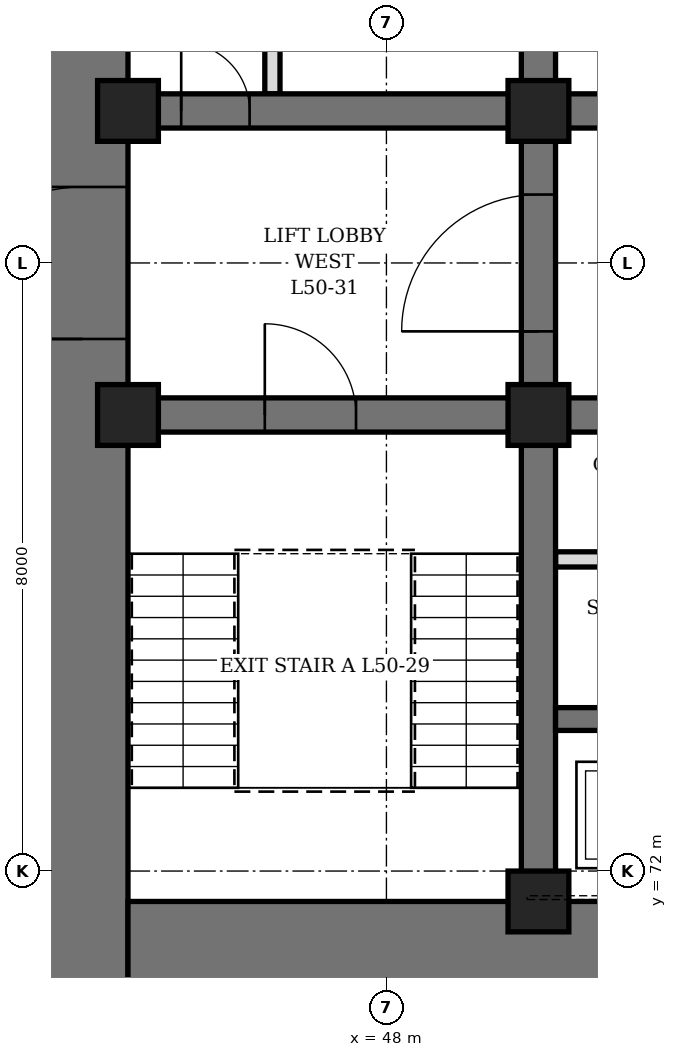
"""IFC4 building model, lengths in metres.
Left out: names, types, materials, properties, quantities, classifications, styles, units other than length and angle.
Written with IfcOpenShell. Run it as: python <this file> out.ifc"""

import sys

from ifc_helpers import new_model, si_unit, direction, frame, frame_2d, origin, origin_2d, place, context, subcontext, project, spatial, rectangle, hollow_rectangle, extrude, element, fill, save


model = new_model("IFC4")
c1 = context("Model", 3, precision=1e-05, world=origin(), true_north=direction((0.0, 1.0)))
c2 = subcontext(c1, "Body", "Model", "MODEL_VIEW")
j1 = project(units=[si_unit("LENGTHUNIT", "METRE"), si_unit("PLANEANGLEUNIT", "RADIAN")], contexts=[c1])
p1 = place(None, origin())
s1 = spatial("IfcSite", under=j1, at=p1, CompositionType="ELEMENT")
p2 = place(p1, origin())
s2 = spatial("IfcBuilding", under=s1, at=p2, CompositionType="ELEMENT")
p3 = place(p2, frame((0.0, 0.0, 223.3)))
s3 = spatial("IfcBuildingStorey", under=s2, at=p3, CompositionType="ELEMENT", Elevation=223.3)
p4 = place(p3, frame((44.0, 70.4, 0.0), z_axis=(0.0, 0.0, 1.0), x_axis=(0.0, 1.0, 0.0)))
e1 = element("IfcWall", 1, at=p4, inside=s3, PredefinedType="SHEAR", context=c2, shape_type="SweptSolid", body=[
    extrude(rectangle(XDim=19.2, YDim=1.2, at=frame_2d((9.6, 0.0))), origin(), (0.0, 0.0, 1.0), 4.2),
])
p5 = place(p4, frame((8.6, 0.0, 0.0)))
e2 = element("IfcOpeningElement", 2, at=p5, cuts=e1, PredefinedType="OPENING", context=c2, shape_type="SweptSolid", body=[
    extrude(rectangle(XDim=2.0, YDim=2.4, at=frame_2d((1.0, 1.2))), frame((0.0, 0.61, 0.0), z_axis=(0.0, -1.0, 0.0), x_axis=(1.0, 0.0, 0.0)), (0.0, 0.0, 1.0), 1.22),
])
p6 = place(p3, frame((44.6, 71.0, 0.0), z_axis=(0.0, 0.0, 1.0), x_axis=(1.0, 0.0, 0.0)))
e3 = element("IfcWall", 3, at=p6, inside=s3, PredefinedType="SHEAR", context=c2, shape_type="SweptSolid", body=[
    extrude(rectangle(XDim=22.8, YDim=1.2, at=frame_2d((11.4, 0.0))), origin(), (0.0, 0.0, 1.0), 4.2),
])
p7 = place(p6, frame((6.35, 0.0, 0.0)))
e4 = element("IfcOpeningElement", 4, at=p7, cuts=e3, PredefinedType="OPENING", context=c2, shape_type="SweptSolid", body=[
    extrude(rectangle(XDim=1.1, YDim=2.2, at=frame_2d((0.55, 1.1))), frame((0.0, 0.61, 0.0), z_axis=(0.0, -1.0, 0.0), x_axis=(1.0, 0.0, 0.0)), (0.0, 0.0, 1.0), 1.22),
])
p8 = place(p6, frame((9.35, 0.0, 0.0)))
e5 = element("IfcOpeningElement", 5, at=p8, cuts=e3, PredefinedType="OPENING", context=c2, shape_type="SweptSolid", body=[
    extrude(rectangle(XDim=1.1, YDim=2.2, at=frame_2d((0.55, 1.1))), frame((0.0, 0.61, 0.0), z_axis=(0.0, -1.0, 0.0), x_axis=(1.0, 0.0, 0.0)), (0.0, 0.0, 1.0), 1.22),
])
p9 = place(p6, frame((12.35, 0.0, 0.0)))
e6 = element("IfcOpeningElement", 6, at=p9, cuts=e3, PredefinedType="OPENING", context=c2, shape_type="SweptSolid", body=[
    extrude(rectangle(XDim=1.1, YDim=2.2, at=frame_2d((0.55, 1.1))), frame((0.0, 0.61, 0.0), z_axis=(0.0, -1.0, 0.0), x_axis=(1.0, 0.0, 0.0)), (0.0, 0.0, 1.0), 1.22),
])
p10 = place(p6, frame((15.35, 0.0, 0.0)))
e7 = element("IfcOpeningElement", 7, at=p10, cuts=e3, PredefinedType="OPENING", context=c2, shape_type="SweptSolid", body=[
    extrude(rectangle(XDim=1.1, YDim=2.2, at=frame_2d((0.55, 1.1))), frame((0.0, 0.61, 0.0), z_axis=(0.0, -1.0, 0.0), x_axis=(1.0, 0.0, 0.0)), (0.0, 0.0, 1.0), 1.22),
])
p11 = place(p3, frame((50.0, 71.6, 0.0), z_axis=(0.0, 0.0, 1.0), x_axis=(0.0, 1.0, 0.0)))
e8 = element("IfcWall", 8, at=p11, inside=s3, PredefinedType="SHEAR", context=c2, shape_type="SweptSolid", body=[
    extrude(rectangle(XDim=16.8, YDim=0.45, at=frame_2d((8.4, 0.0))), origin(), (0.0, 0.0, 1.0), 4.2),
])
p12 = place(p11, frame((7.5, 0.0, 0.0)))
e9 = element("IfcOpeningElement", 9, at=p12, cuts=e8, PredefinedType="OPENING", context=c2, shape_type="SweptSolid", body=[
    extrude(rectangle(XDim=1.8, YDim=2.4, at=frame_2d((0.9, 1.2))), frame((0.0, 0.235, 0.0), z_axis=(0.0, -1.0, 0.0), x_axis=(1.0, 0.0, 0.0)), (0.0, 0.0, 1.0), 0.47),
])
p13 = place(p3, frame((44.6, 78.0, 0.0), z_axis=(0.0, 0.0, 1.0), x_axis=(1.0, 0.0, 0.0)))
e10 = element("IfcWall", 10, at=p13, inside=s3, PredefinedType="SHEAR", context=c2, shape_type="SweptSolid", body=[
    extrude(rectangle(XDim=5.175, YDim=0.45, at=frame_2d((2.587, 0.0))), origin(), (0.0, 0.0, 1.0), 4.2),
])
p14 = place(p13, frame((1.8, 0.0, 0.0)))
e11 = element("IfcOpeningElement", 11, at=p14, cuts=e10, PredefinedType="OPENING", context=c2, shape_type="SweptSolid", body=[
    extrude(rectangle(XDim=1.2, YDim=2.1, at=frame_2d((0.6, 1.05))), frame((0.0, 0.235, 0.0), z_axis=(0.0, -1.0, 0.0), x_axis=(1.0, 0.0, 0.0)), (0.0, 0.0, 1.0), 0.47),
])
p15 = place(p3, frame((44.6, 82.0, 0.0), z_axis=(0.0, 0.0, 1.0), x_axis=(1.0, 0.0, 0.0)))
e12 = element("IfcWall", 12, at=p15, inside=s3, PredefinedType="SHEAR", context=c2, shape_type="SweptSolid", body=[
    extrude(rectangle(XDim=5.175, YDim=0.45, at=frame_2d((2.587, 0.0))), origin(), (0.0, 0.0, 1.0), 4.2),
])
p16 = place(p15, frame((0.7, 0.0, 0.0)))
e13 = element("IfcOpeningElement", 13, at=p16, cuts=e12, PredefinedType="OPENING", context=c2, shape_type="SweptSolid", body=[
    extrude(rectangle(XDim=0.9, YDim=2.1, at=frame_2d((0.45, 1.05))), frame((0.0, 0.235, 0.0), z_axis=(0.0, -1.0, 0.0), x_axis=(1.0, 0.0, 0.0)), (0.0, 0.0, 1.0), 0.47),
])
p17 = place(p3, frame((50.225, 78.0, 0.0), z_axis=(0.0, 0.0, 1.0), x_axis=(1.0, 0.0, 0.0)))
e14 = element("IfcWall", 14, at=p17, inside=s3, PredefinedType="SHEAR", context=c2, shape_type="SweptSolid", body=[
    extrude(rectangle(XDim=11.55, YDim=0.45, at=frame_2d((5.775, 0.0))), origin(), (0.0, 0.0, 1.0), 4.2),
])
p18 = place(p17, frame((0.825, 0.0, 0.0)))
e15 = element("IfcOpeningElement", 15, at=p18, cuts=e14, PredefinedType="OPENING", context=c2, shape_type="SweptSolid", body=[
    extrude(rectangle(XDim=0.9, YDim=2.1, at=frame_2d((0.45, 1.05))), frame((0.0, 0.235, 0.0), z_axis=(0.0, -1.0, 0.0), x_axis=(1.0, 0.0, 0.0)), (0.0, 0.0, 1.0), 0.47),
])
p19 = place(p17, frame((3.825, 0.0, 0.0)))
e16 = element("IfcOpeningElement", 16, at=p19, cuts=e14, PredefinedType="OPENING", context=c2, shape_type="SweptSolid", body=[
    extrude(rectangle(XDim=0.9, YDim=2.1, at=frame_2d((0.45, 1.05))), frame((0.0, 0.235, 0.0), z_axis=(0.0, -1.0, 0.0), x_axis=(1.0, 0.0, 0.0)), (0.0, 0.0, 1.0), 0.47),
])
p20 = place(p17, frame((6.825, 0.0, 0.0)))
e17 = element("IfcOpeningElement", 17, at=p20, cuts=e14, PredefinedType="OPENING", context=c2, shape_type="SweptSolid", body=[
    extrude(rectangle(XDim=0.9, YDim=2.1, at=frame_2d((0.45, 1.05))), frame((0.0, 0.235, 0.0), z_axis=(0.0, -1.0, 0.0), x_axis=(1.0, 0.0, 0.0)), (0.0, 0.0, 1.0), 0.47),
])
p21 = place(p17, frame((9.825, 0.0, 0.0)))
e18 = element("IfcOpeningElement", 18, at=p21, cuts=e14, PredefinedType="OPENING", context=c2, shape_type="SweptSolid", body=[
    extrude(rectangle(XDim=0.9, YDim=2.1, at=frame_2d((0.45, 1.05))), frame((0.0, 0.235, 0.0), z_axis=(0.0, -1.0, 0.0), x_axis=(1.0, 0.0, 0.0)), (0.0, 0.0, 1.0), 0.47),
])
p22 = place(p3, frame((50.225, 82.0, 0.0), z_axis=(0.0, 0.0, 1.0), x_axis=(1.0, 0.0, 0.0)))
e19 = element("IfcWall", 19, at=p22, inside=s3, PredefinedType="SHEAR", context=c2, shape_type="SweptSolid", body=[
    extrude(rectangle(XDim=11.55, YDim=0.45, at=frame_2d((5.775, 0.0))), origin(), (0.0, 0.0, 1.0), 4.2),
])
p23 = place(p22, frame((0.825, 0.0, 0.0)))
e20 = element("IfcOpeningElement", 20, at=p23, cuts=e19, PredefinedType="OPENING", context=c2, shape_type="SweptSolid", body=[
    extrude(rectangle(XDim=0.9, YDim=2.1, at=frame_2d((0.45, 1.05))), frame((0.0, 0.235, 0.0), z_axis=(0.0, -1.0, 0.0), x_axis=(1.0, 0.0, 0.0)), (0.0, 0.0, 1.0), 0.47),
])
p24 = place(p22, frame((3.825, 0.0, 0.0)))
e21 = element("IfcOpeningElement", 21, at=p24, cuts=e19, PredefinedType="OPENING", context=c2, shape_type="SweptSolid", body=[
    extrude(rectangle(XDim=0.9, YDim=2.1, at=frame_2d((0.45, 1.05))), frame((0.0, 0.235, 0.0), z_axis=(0.0, -1.0, 0.0), x_axis=(1.0, 0.0, 0.0)), (0.0, 0.0, 1.0), 0.47),
])
p25 = place(p22, frame((6.825, 0.0, 0.0)))
e22 = element("IfcOpeningElement", 22, at=p25, cuts=e19, PredefinedType="OPENING", context=c2, shape_type="SweptSolid", body=[
    extrude(rectangle(XDim=0.9, YDim=2.1, at=frame_2d((0.45, 1.05))), frame((0.0, 0.235, 0.0), z_axis=(0.0, -1.0, 0.0), x_axis=(1.0, 0.0, 0.0)), (0.0, 0.0, 1.0), 0.47),
])
p26 = place(p22, frame((9.825, 0.0, 0.0)))
e23 = element("IfcOpeningElement", 23, at=p26, cuts=e19, PredefinedType="OPENING", context=c2, shape_type="SweptSolid", body=[
    extrude(rectangle(XDim=0.9, YDim=2.1, at=frame_2d((0.45, 1.05))), frame((0.0, 0.235, 0.0), z_axis=(0.0, -1.0, 0.0), x_axis=(1.0, 0.0, 0.0)), (0.0, 0.0, 1.0), 0.47),
])
p27 = place(p3, frame((50.225, 74.0, 0.0), z_axis=(0.0, 0.0, 1.0), x_axis=(1.0, 0.0, 0.0)))
e24 = element("IfcWall", 24, at=p27, inside=s3, PredefinedType="SHEAR", context=c2, shape_type="SweptSolid", body=[
    extrude(rectangle(XDim=11.55, YDim=0.3, at=frame_2d((5.775, 0.0))), origin(), (0.0, 0.0, 1.0), 4.2),
])
for number, where, z_axis, x_axis in (
    (25, (44.6, 78.0, 0.0), (0.0, 0.0, 1.0), (1.0, 0.0, 0.0)),
    (26, (44.6, 82.0, 0.0), (0.0, 0.0, 1.0), (1.0, 0.0, 0.0)),
    (27, (50.0, 71.6, 0.0), (0.0, 0.0, 1.0), (1.0, 0.0, 0.0)),
    (28, (50.0, 78.0, 0.0), (0.0, 0.0, 1.0), (1.0, 0.0, 0.0)),
    (29, (50.0, 82.0, 0.0), (0.0, 0.0, 1.0), (1.0, 0.0, 0.0)),
):
    element("IfcColumn", number, at=place(p3, frame(where, z_axis=z_axis, x_axis=x_axis)), inside=s3, PredefinedType="COLUMN", context=c2, shape_type="SweptSolid", body=[
        extrude(hollow_rectangle(XDim=0.8, YDim=0.8, WallThickness=0.1, at=origin_2d()), origin(), (0.0, 0.0, 1.0), 4.2),
    ])
p28 = place(p3, frame((46.5, 82.225, 0.0), z_axis=(0.0, 0.0, 1.0), x_axis=(0.0, 1.0, 0.0)))
e30 = element("IfcWall", 30, at=p28, inside=s3, PredefinedType="PARTITIONING", context=c2, shape_type="SweptSolid", body=[
    extrude(rectangle(XDim=3.05, YDim=0.2, at=frame_2d((1.525, 0.0))), origin(), (0.0, 0.0, 1.0), 4.04),
])
p29 = place(p28, frame((1.075, 0.0, 0.0)))
e31 = element("IfcOpeningElement", 31, at=p29, cuts=e30, PredefinedType="OPENING", context=c2, shape_type="SweptSolid", body=[
    extrude(rectangle(XDim=0.9, YDim=2.1, at=frame_2d((0.45, 1.05))), frame((0.0, 0.11, 0.0), z_axis=(0.0, -1.0, 0.0), x_axis=(1.0, 0.0, 0.0)), (0.0, 0.0, 1.0), 0.22),
])
p30 = place(p3, frame((50.225, 76.1, 0.0), z_axis=(0.0, 0.0, 1.0), x_axis=(1.0, 0.0, 0.0)))
e32 = element("IfcWall", 32, at=p30, inside=s3, PredefinedType="PARTITIONING", context=c2, shape_type="SweptSolid", body=[
    extrude(rectangle(XDim=2.55, YDim=0.2, at=frame_2d((1.275, 0.0))), origin(), (0.0, 0.0, 1.0), 4.04),
])
p31 = place(p30, frame((0.825, 0.0, 0.0)))
e33 = element("IfcOpeningElement", 33, at=p31, cuts=e32, PredefinedType="OPENING", context=c2, shape_type="SweptSolid", body=[
    extrude(rectangle(XDim=0.9, YDim=2.1, at=frame_2d((0.45, 1.05))), frame((0.0, 0.11, 0.0), z_axis=(0.0, -1.0, 0.0), x_axis=(1.0, 0.0, 0.0)), (0.0, 0.0, 1.0), 0.22),
])
p32 = place(p16, origin())
e34 = element("IfcDoor", 34, at=p32, inside=s3, OperationType="SINGLE_SWING_LEFT", PredefinedType="DOOR", context=c2, shape_type="SweptSolid", body=[
    extrude(rectangle(XDim=0.9, YDim=2.1, at=frame_2d((0.45, 1.05))), frame((0.0, 0.225, 0.0), z_axis=(0.0, -1.0, 0.0), x_axis=(1.0, 0.0, 0.0)), (0.0, 0.0, 1.0), 0.449),
])
fill(e13, e34)
p33 = place(p14, origin())
e35 = element("IfcDoor", 35, at=p33, inside=s3, OperationType="SINGLE_SWING_LEFT", PredefinedType="DOOR", context=c2, shape_type="SweptSolid", body=[
    extrude(rectangle(XDim=1.2, YDim=2.1, at=frame_2d((0.6, 1.05))), frame((0.0, 0.225, 0.0), z_axis=(0.0, -1.0, 0.0), x_axis=(1.0, 0.0, 0.0)), (0.0, 0.0, 1.0), 0.449),
])
fill(e11, e35)
p34 = place(p5, origin())
e36 = element("IfcDoor", 36, at=p34, inside=s3, OperationType="DOUBLE_DOOR_SINGLE_SWING", PredefinedType="DOOR", context=c2, shape_type="SweptSolid", body=[
    extrude(rectangle(XDim=2.0, YDim=2.4, at=frame_2d((1.0, 1.2))), frame((0.0, 0.35, 0.0), z_axis=(0.0, -1.0, 0.0), x_axis=(1.0, 0.0, 0.0)), (0.0, 0.0, 1.0), 0.7),
])
fill(e2, e36)
p35 = place(p12, origin())
e37 = element("IfcDoor", 37, at=p35, inside=s3, OperationType="DOUBLE_DOOR_SINGLE_SWING", PredefinedType="DOOR", context=c2, shape_type="SweptSolid", body=[
    extrude(rectangle(XDim=1.8, YDim=2.4, at=frame_2d((0.9, 1.2))), frame((0.0, 0.225, 0.0), z_axis=(0.0, -1.0, 0.0), x_axis=(1.0, 0.0, 0.0)), (0.0, 0.0, 1.0), 0.449),
])
fill(e9, e37)
save(model, sys.argv[1])
